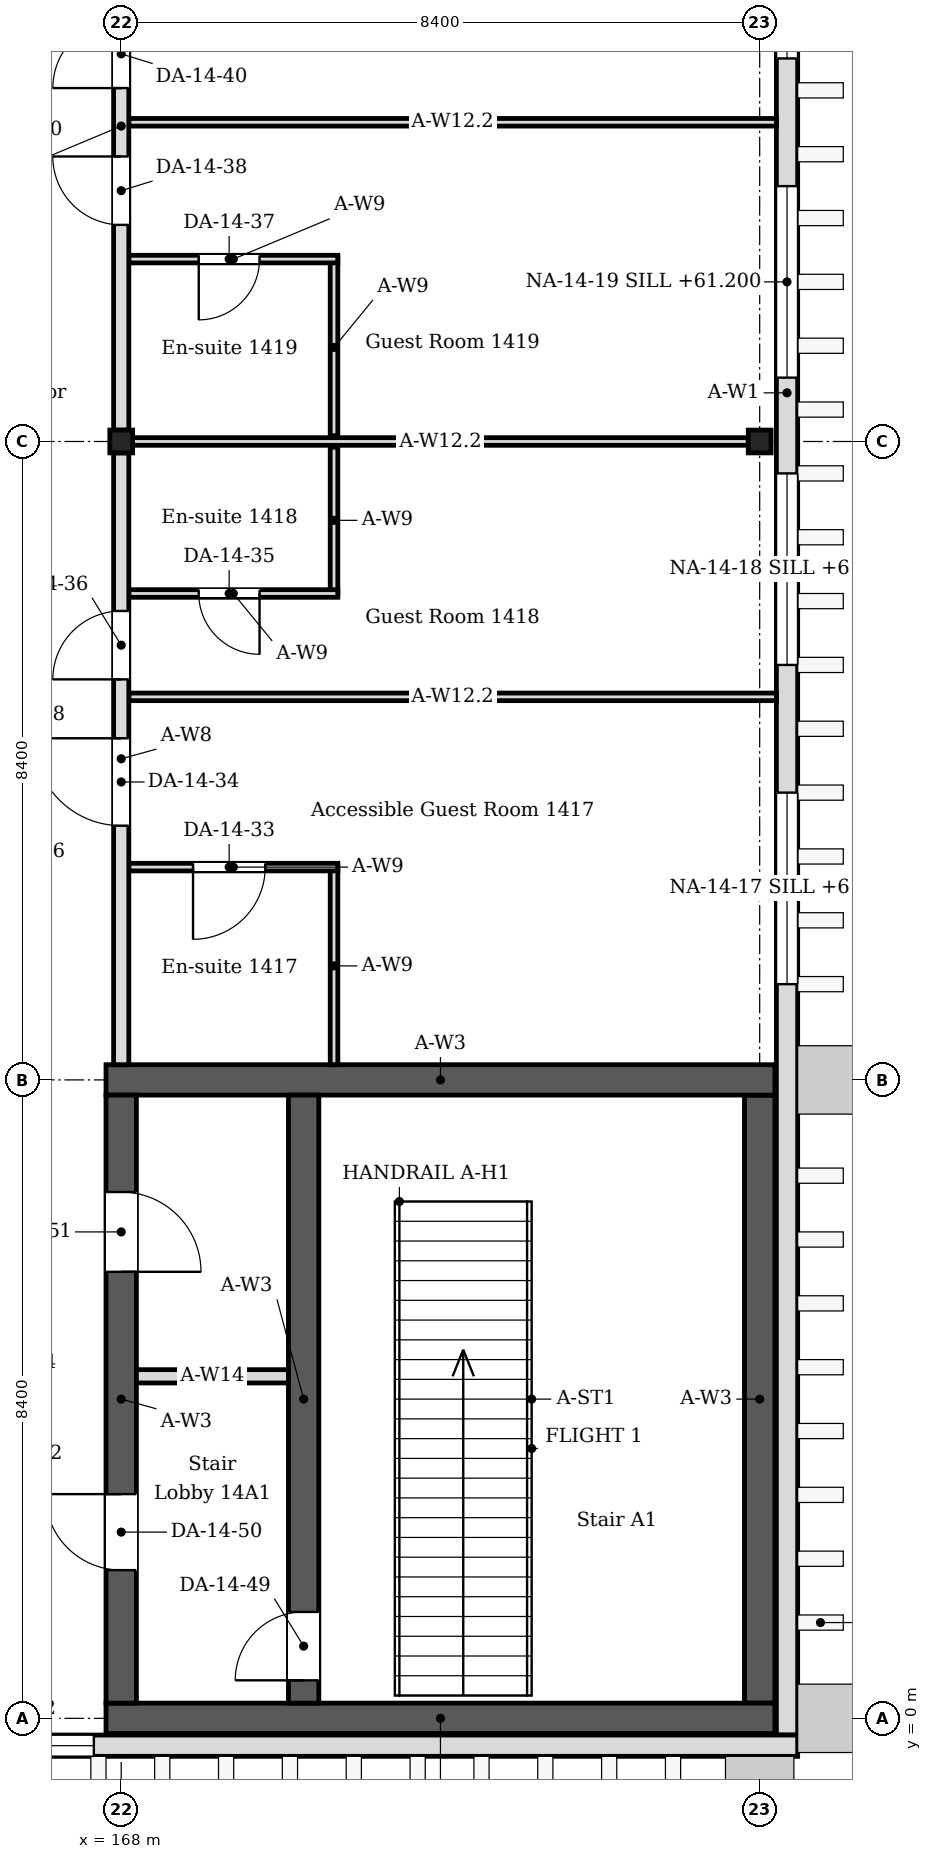
"""IFC4 building model, lengths in metres.
Left out: names, types, materials, properties, quantities, classifications, styles, units other than length and angle.
Written with IfcOpenShell. Run it as: python <this file> out.ifc"""

import sys

from ifc_helpers import new_model, si_unit, direction, frame, frame_2d, origin, origin_2d, place, context, subcontext, project, spatial, rectangle, i_section, extrude, element, fill, save


model = new_model("IFC4")
c1 = context("Model", 3, precision=1e-05, world=origin(), true_north=direction((0.0, 1.0)))
c2 = subcontext(c1, "Body", "Model", "MODEL_VIEW")
j1 = project(units=[si_unit("LENGTHUNIT", "METRE"), si_unit("PLANEANGLEUNIT", "RADIAN")], contexts=[c1])
p1 = place(None, origin())
s1 = spatial("IfcSite", under=j1, at=p1, CompositionType="ELEMENT")
p2 = place(p1, origin())
s2 = spatial("IfcBuilding", under=s1, at=p2, CompositionType="ELEMENT")
p3 = place(p2, frame((0.0, 0.0, 60.6)))
s3 = spatial("IfcBuildingStorey", under=s2, at=p3, CompositionType="ELEMENT", Elevation=60.6)
for number, where, z_axis, x_axis in (
    (1, (168.0, 16.8, 0.0), (0.0, 0.0, 1.0), (1.0, 0.0, 0.0)),
    (2, (176.4, 16.8, 0.0), (0.0, 0.0, 1.0), (1.0, 0.0, 0.0)),
):
    element("IfcColumn", number, at=place(p3, frame(where, z_axis=z_axis, x_axis=x_axis)), inside=s3, PredefinedType="COLUMN", context=c2, shape_type="SweptSolid", body=[
        extrude(i_section(OverallWidth=0.3, OverallDepth=0.3, WebThickness=0.01, FlangeThickness=0.015, FilletRadius=0.013, at=origin_2d()), origin(), (0.0, 0.0, 1.0), 4.2),
    ])
for number, where, z_axis, x_axis in (
    (3, (167.8, 0.0, 0.0), (0.0, 0.0, 1.0), (1.0, 0.0, 0.0)),
    (4, (167.8, 8.4, 0.0), (0.0, 0.0, 1.0), (1.0, 0.0, 0.0)),
):
    element("IfcWall", number, at=place(p3, frame(where, z_axis=z_axis, x_axis=x_axis)), inside=s3, PredefinedType="SOLIDWALL", context=c2, shape_type="SweptSolid", body=[
        extrude(rectangle(XDim=8.8, YDim=0.4, at=frame_2d((4.4, 0.0))), origin(), (0.0, 0.0, 1.0), 4.05),
    ])
p4 = place(p3, frame((168.0, 0.2, 0.0), z_axis=(0.0, 0.0, 1.0), x_axis=(0.0, 1.0, 0.0)))
e5 = element("IfcWall", 5, at=p4, inside=s3, PredefinedType="SOLIDWALL", context=c2, shape_type="SweptSolid", body=[
    extrude(rectangle(XDim=8.0, YDim=0.4, at=frame_2d((4.0, 0.0))), origin(), (0.0, 0.0, 1.0), 4.05),
])
p5 = place(p4, frame((1.75, 0.0, 0.0)))
e6 = element("IfcOpeningElement", 6, at=p5, cuts=e5, PredefinedType="OPENING", context=c2, shape_type="SweptSolid", body=[
    extrude(rectangle(XDim=1.0, YDim=2.1, at=frame_2d((0.5, 1.05))), frame((0.0, 0.21, 0.0), z_axis=(0.0, -1.0, 0.0), x_axis=(1.0, 0.0, 0.0)), (0.0, 0.0, 1.0), 0.42),
])
p6 = place(p4, frame((5.675, 0.0, 0.0)))
e7 = element("IfcOpeningElement", 7, at=p6, cuts=e5, PredefinedType="OPENING", context=c2, shape_type="SweptSolid", body=[
    extrude(rectangle(XDim=1.05, YDim=2.1, at=frame_2d((0.525, 1.05))), frame((0.0, 0.21, 0.0), z_axis=(0.0, -1.0, 0.0), x_axis=(1.0, 0.0, 0.0)), (0.0, 0.0, 1.0), 0.42),
])
p7 = place(p3, frame((176.4, 0.2, 0.0), z_axis=(0.0, 0.0, 1.0), x_axis=(0.0, 1.0, 0.0)))
e8 = element("IfcWall", 8, at=p7, inside=s3, PredefinedType="SOLIDWALL", context=c2, shape_type="SweptSolid", body=[
    extrude(rectangle(XDim=8.0, YDim=0.4, at=frame_2d((4.0, 0.0))), origin(), (0.0, 0.0, 1.0), 4.05),
])
p8 = place(p3, frame((176.76, -0.22, 0.0), z_axis=(0.0, 0.0, 1.0), x_axis=(0.0, 1.0, 0.0)))
e9 = element("IfcWall", 9, at=p8, inside=s3, PredefinedType="SOLIDWALL", context=c2, shape_type="SweptSolid", body=[
    extrude(rectangle(XDim=67.64, YDim=0.28, at=frame_2d((33.82, 0.0))), origin(), (0.0, 0.0, 1.0), 4.05),
])
p9 = place(p8, frame((9.88, 0.0, 0.45)))
e10 = element("IfcOpeningElement", 10, at=p9, cuts=e9, PredefinedType="OPENING", context=c2, shape_type="SweptSolid", body=[
    extrude(rectangle(XDim=2.52, YDim=2.1, at=frame_2d((1.26, 1.05))), frame((0.0, 0.15, 0.0), z_axis=(0.0, -1.0, 0.0), x_axis=(1.0, 0.0, 0.0)), (0.0, 0.0, 1.0), 0.3),
])
p10 = place(p8, frame((14.08, 0.0, 0.6)))
e11 = element("IfcOpeningElement", 11, at=p10, cuts=e9, PredefinedType="OPENING", context=c2, shape_type="SweptSolid", body=[
    extrude(rectangle(XDim=2.52, YDim=2.4, at=frame_2d((1.26, 1.2))), frame((0.0, 0.15, 0.0), z_axis=(0.0, -1.0, 0.0), x_axis=(1.0, 0.0, 0.0)), (0.0, 0.0, 1.0), 0.3),
])
p11 = place(p8, frame((17.86, 0.0, 0.6)))
e12 = element("IfcOpeningElement", 12, at=p11, cuts=e9, PredefinedType="OPENING", context=c2, shape_type="SweptSolid", body=[
    extrude(rectangle(XDim=2.52, YDim=2.4, at=frame_2d((1.26, 1.2))), frame((0.0, 0.15, 0.0), z_axis=(0.0, -1.0, 0.0), x_axis=(1.0, 0.0, 0.0)), (0.0, 0.0, 1.0), 0.3),
])
p12 = place(p8, frame((22.06, 0.0, 0.6)))
e13 = element("IfcOpeningElement", 13, at=p12, cuts=e9, PredefinedType="OPENING", context=c2, shape_type="SweptSolid", body=[
    extrude(rectangle(XDim=2.52, YDim=2.4, at=frame_2d((1.26, 1.2))), frame((0.0, 0.15, 0.0), z_axis=(0.0, -1.0, 0.0), x_axis=(1.0, 0.0, 0.0)), (0.0, 0.0, 1.0), 0.3),
])
p13 = place(p8, frame((42.64, 0.0, 0.6)))
e14 = element("IfcOpeningElement", 14, at=p13, cuts=e9, PredefinedType="OPENING", context=c2, shape_type="SweptSolid", body=[
    extrude(rectangle(XDim=2.52, YDim=2.4, at=frame_2d((1.26, 1.2))), frame((0.0, 0.15, 0.0), z_axis=(0.0, -1.0, 0.0), x_axis=(1.0, 0.0, 0.0)), (0.0, 0.0, 1.0), 0.3),
])
p14 = place(p8, frame((46.84, 0.0, 0.6)))
e15 = element("IfcOpeningElement", 15, at=p14, cuts=e9, PredefinedType="OPENING", context=c2, shape_type="SweptSolid", body=[
    extrude(rectangle(XDim=2.52, YDim=2.4, at=frame_2d((1.26, 1.2))), frame((0.0, 0.15, 0.0), z_axis=(0.0, -1.0, 0.0), x_axis=(1.0, 0.0, 0.0)), (0.0, 0.0, 1.0), 0.3),
])
p15 = place(p8, frame((51.04, 0.0, 0.6)))
e16 = element("IfcOpeningElement", 16, at=p15, cuts=e9, PredefinedType="OPENING", context=c2, shape_type="SweptSolid", body=[
    extrude(rectangle(XDim=2.52, YDim=2.4, at=frame_2d((1.26, 1.2))), frame((0.0, 0.15, 0.0), z_axis=(0.0, -1.0, 0.0), x_axis=(1.0, 0.0, 0.0)), (0.0, 0.0, 1.0), 0.3),
])
p16 = place(p8, frame((55.24, 0.0, 0.6)))
e17 = element("IfcOpeningElement", 17, at=p16, cuts=e9, PredefinedType="OPENING", context=c2, shape_type="SweptSolid", body=[
    extrude(rectangle(XDim=2.52, YDim=2.4, at=frame_2d((1.26, 1.2))), frame((0.0, 0.15, 0.0), z_axis=(0.0, -1.0, 0.0), x_axis=(1.0, 0.0, 0.0)), (0.0, 0.0, 1.0), 0.3),
])
p17 = place(p3, frame((156.7, -0.36, 0.0), z_axis=(0.0, 0.0, 1.0), x_axis=(1.0, 0.0, 0.0)))
e18 = element("IfcWall", 18, at=p17, inside=s3, PredefinedType="SOLIDWALL", context=c2, shape_type="SweptSolid", body=[
    extrude(rectangle(XDim=20.2, YDim=0.28, at=frame_2d((10.1, 0.0))), origin(), (0.0, 0.0, 1.0), 4.05),
])
p18 = place(p17, frame((9.26, 0.0, 0.6)))
e19 = element("IfcOpeningElement", 19, at=p18, cuts=e18, PredefinedType="OPENING", context=c2, shape_type="SweptSolid", body=[
    extrude(rectangle(XDim=1.68, YDim=2.4, at=frame_2d((0.84, 1.2))), frame((0.0, 0.15, 0.0), z_axis=(0.0, -1.0, 0.0), x_axis=(1.0, 0.0, 0.0)), (0.0, 0.0, 1.0), 0.3),
])
p19 = place(p17, frame((3.34, 0.0, 0.6)))
e20 = element("IfcOpeningElement", 20, at=p19, cuts=e18, PredefinedType="OPENING", context=c2, shape_type="SweptSolid", body=[
    extrude(rectangle(XDim=2.52, YDim=2.4, at=frame_2d((1.26, 1.2))), frame((0.0, 0.15, 0.0), z_axis=(0.0, -1.0, 0.0), x_axis=(1.0, 0.0, 0.0)), (0.0, 0.0, 1.0), 0.3),
])
p20 = place(p3, frame((170.8, 8.6, 0.0), z_axis=(0.0, 0.0, 1.0), x_axis=(0.0, 1.0, 0.0)))
e21 = element("IfcWall", 21, at=p20, inside=s3, PredefinedType="PARTITIONING", context=c2, shape_type="SweptSolid", body=[
    extrude(rectangle(XDim=2.6, YDim=0.1, at=frame_2d((1.3, 0.0))), origin(), (0.0, 0.0, 1.0), 4.05),
])
p21 = place(p3, frame((170.85, 11.2, 0.0), z_axis=(0.0, 0.0, 1.0), x_axis=(-1.0, 0.0, 0.0)))
e22 = element("IfcWall", 22, at=p21, inside=s3, PredefinedType="PARTITIONING", context=c2, shape_type="SweptSolid", body=[
    extrude(rectangle(XDim=2.75, YDim=0.1, at=frame_2d((1.375, 0.0))), origin(), (0.0, 0.0, 1.0), 4.05),
])
p22 = place(p21, frame((0.955, 0.0, 0.0)))
e23 = element("IfcOpeningElement", 23, at=p22, cuts=e22, PredefinedType="OPENING", context=c2, shape_type="SweptSolid", body=[
    extrude(rectangle(XDim=0.95, YDim=2.1, at=frame_2d((0.475, 1.05))), frame((0.0, 0.06, 0.0), z_axis=(0.0, -1.0, 0.0), x_axis=(1.0, 0.0, 0.0)), (0.0, 0.0, 1.0), 0.12),
])
p23 = place(p3, frame((170.8, 14.8, 0.0), z_axis=(0.0, 0.0, 1.0), x_axis=(0.0, 1.0, 0.0)))
e24 = element("IfcWall", 24, at=p23, inside=s3, PredefinedType="PARTITIONING", context=c2, shape_type="SweptSolid", body=[
    extrude(rectangle(XDim=1.925, YDim=0.1, at=frame_2d((0.962, 0.0))), origin(), (0.0, 0.0, 1.0), 4.05),
])
p24 = place(p3, frame((170.85, 14.8, 0.0), z_axis=(0.0, 0.0, 1.0), x_axis=(-1.0, 0.0, 0.0)))
e25 = element("IfcWall", 25, at=p24, inside=s3, PredefinedType="PARTITIONING", context=c2, shape_type="SweptSolid", body=[
    extrude(rectangle(XDim=2.75, YDim=0.1, at=frame_2d((1.375, 0.0))), origin(), (0.0, 0.0, 1.0), 4.05),
])
p25 = place(p24, frame((1.03, 0.0, 0.0)))
e26 = element("IfcOpeningElement", 26, at=p25, cuts=e25, PredefinedType="OPENING", context=c2, shape_type="SweptSolid", body=[
    extrude(rectangle(XDim=0.8, YDim=2.1, at=frame_2d((0.4, 1.05))), frame((0.0, 0.06, 0.0), z_axis=(0.0, -1.0, 0.0), x_axis=(1.0, 0.0, 0.0)), (0.0, 0.0, 1.0), 0.12),
])
p26 = place(p3, frame((170.8, 16.875, 0.0), z_axis=(0.0, 0.0, 1.0), x_axis=(0.0, 1.0, 0.0)))
e27 = element("IfcWall", 27, at=p26, inside=s3, PredefinedType="PARTITIONING", context=c2, shape_type="SweptSolid", body=[
    extrude(rectangle(XDim=2.325, YDim=0.1, at=frame_2d((1.163, 0.0))), origin(), (0.0, 0.0, 1.0), 4.05),
])
p27 = place(p3, frame((170.85, 19.2, 0.0), z_axis=(0.0, 0.0, 1.0), x_axis=(-1.0, 0.0, 0.0)))
e28 = element("IfcWall", 28, at=p27, inside=s3, PredefinedType="PARTITIONING", context=c2, shape_type="SweptSolid", body=[
    extrude(rectangle(XDim=2.75, YDim=0.1, at=frame_2d((1.375, 0.0))), origin(), (0.0, 0.0, 1.0), 4.05),
])
p28 = place(p27, frame((1.03, 0.0, 0.0)))
e29 = element("IfcOpeningElement", 29, at=p28, cuts=e28, PredefinedType="OPENING", context=c2, shape_type="SweptSolid", body=[
    extrude(rectangle(XDim=0.8, YDim=2.1, at=frame_2d((0.4, 1.05))), frame((0.0, 0.06, 0.0), z_axis=(0.0, -1.0, 0.0), x_axis=(1.0, 0.0, 0.0)), (0.0, 0.0, 1.0), 0.12),
])
p29 = place(p3, frame((168.15, 16.8, 0.0), z_axis=(0.0, 0.0, 1.0), x_axis=(1.0, 0.0, 0.0)))
e30 = element("IfcWall", 30, at=p29, inside=s3, PredefinedType="PARTITIONING", context=c2, shape_type="SweptSolid", body=[
    extrude(rectangle(XDim=8.1, YDim=0.1, at=frame_2d((4.05, 0.0))), origin(), (0.0, 0.0, 1.0), 3.55),
])
for number, where, z_axis, x_axis in (
    (31, (168.1, 13.44, 0.0), (0.0, 0.0, 1.0), (1.0, 0.0, 0.0)),
    (32, (168.1, 21.0, 0.0), (0.0, 0.0, 1.0), (1.0, 0.0, 0.0)),
):
    element("IfcWall", number, at=place(p3, frame(where, z_axis=z_axis, x_axis=x_axis)), inside=s3, PredefinedType="PARTITIONING", context=c2, shape_type="SweptSolid", body=[
        extrude(rectangle(XDim=8.52, YDim=0.1, at=frame_2d((4.26, 0.0))), origin(), (0.0, 0.0, 1.0), 3.55),
    ])
p30 = place(p3, frame((168.0, 8.6, 0.0), z_axis=(0.0, 0.0, 1.0), x_axis=(0.0, 1.0, 0.0)))
e33 = element("IfcWall", 33, at=p30, inside=s3, PredefinedType="PARTITIONING", context=c2, shape_type="SweptSolid", body=[
    extrude(rectangle(XDim=8.05, YDim=0.2, at=frame_2d((4.025, 0.0))), origin(), (0.0, 0.0, 1.0), 3.45),
])
p31 = place(p30, frame((3.145, 0.0, 0.0)))
e34 = element("IfcOpeningElement", 34, at=p31, cuts=e33, PredefinedType="OPENING", context=c2, shape_type="SweptSolid", body=[
    extrude(rectangle(XDim=1.15, YDim=2.1, at=frame_2d((0.575, 1.05))), frame((0.0, 0.11, 0.0), z_axis=(0.0, -1.0, 0.0), x_axis=(1.0, 0.0, 0.0)), (0.0, 0.0, 1.0), 0.22),
])
p32 = place(p30, frame((5.07, 0.0, 0.0)))
e35 = element("IfcOpeningElement", 35, at=p32, cuts=e33, PredefinedType="OPENING", context=c2, shape_type="SweptSolid", body=[
    extrude(rectangle(XDim=0.9, YDim=2.1, at=frame_2d((0.45, 1.05))), frame((0.0, 0.11, 0.0), z_axis=(0.0, -1.0, 0.0), x_axis=(1.0, 0.0, 0.0)), (0.0, 0.0, 1.0), 0.22),
])
p33 = place(p3, frame((168.0, 16.95, 0.0), z_axis=(0.0, 0.0, 1.0), x_axis=(0.0, 1.0, 0.0)))
e36 = element("IfcWall", 36, at=p33, inside=s3, PredefinedType="PARTITIONING", context=c2, shape_type="SweptSolid", body=[
    extrude(rectangle(XDim=8.0, YDim=0.2, at=frame_2d((4.0, 0.0))), origin(), (0.0, 0.0, 1.0), 3.45),
])
p34 = place(p33, frame((2.7, 0.0, 0.0)))
e37 = element("IfcOpeningElement", 37, at=p34, cuts=e36, PredefinedType="OPENING", context=c2, shape_type="SweptSolid", body=[
    extrude(rectangle(XDim=0.9, YDim=2.1, at=frame_2d((0.45, 1.05))), frame((0.0, 0.11, 0.0), z_axis=(0.0, -1.0, 0.0), x_axis=(1.0, 0.0, 0.0)), (0.0, 0.0, 1.0), 0.22),
])
p35 = place(p33, frame((4.5, 0.0, 0.0)))
e38 = element("IfcOpeningElement", 38, at=p35, cuts=e36, PredefinedType="OPENING", context=c2, shape_type="SweptSolid", body=[
    extrude(rectangle(XDim=0.9, YDim=2.1, at=frame_2d((0.45, 1.05))), frame((0.0, 0.11, 0.0), z_axis=(0.0, -1.0, 0.0), x_axis=(1.0, 0.0, 0.0)), (0.0, 0.0, 1.0), 0.22),
])
p36 = place(p3, frame((170.4, 0.2, 0.0), z_axis=(0.0, 0.0, 1.0), x_axis=(0.0, 1.0, 0.0)))
e39 = element("IfcWall", 39, at=p36, inside=s3, PredefinedType="SOLIDWALL", context=c2, shape_type="SweptSolid", body=[
    extrude(rectangle(XDim=8.0, YDim=0.4, at=frame_2d((4.0, 0.0))), origin(), (0.0, 0.0, 1.0), 4.05),
])
p37 = place(p36, frame((0.3, 0.0, 0.0)))
e40 = element("IfcOpeningElement", 40, at=p37, cuts=e39, PredefinedType="OPENING", context=c2, shape_type="SweptSolid", body=[
    extrude(rectangle(XDim=0.9, YDim=2.1, at=frame_2d((0.45, 1.05))), frame((0.0, 0.21, 0.0), z_axis=(0.0, -1.0, 0.0), x_axis=(1.0, 0.0, 0.0)), (0.0, 0.0, 1.0), 0.42),
])
p38 = place(p3, frame((168.2, 4.5, 0.0), z_axis=(0.0, 0.0, 1.0), x_axis=(1.0, 0.0, 0.0)))
e41 = element("IfcWall", 41, at=p38, inside=s3, PredefinedType="PARTITIONING", context=c2, shape_type="SweptSolid", body=[
    extrude(rectangle(XDim=2.0, YDim=0.175, at=frame_2d((1.0, 0.0))), origin(), (0.0, 0.0, 1.0), 4.05),
])
p39 = place(p9, origin())
e42 = element("IfcWindow", 42, at=p39, inside=s3, PartitioningType="SINGLE_PANEL", PredefinedType="WINDOW", context=c2, shape_type="SweptSolid", body=[
    extrude(rectangle(XDim=2.52, YDim=2.1, at=frame_2d((1.26, 1.05))), frame((0.0, 0.03, 0.0), z_axis=(0.0, -1.0, 0.0), x_axis=(1.0, 0.0, 0.0)), (0.0, 0.0, 1.0), 0.06),
])
fill(e10, e42)
p40 = place(p10, origin())
e43 = element("IfcWindow", 43, at=p40, inside=s3, PartitioningType="SINGLE_PANEL", PredefinedType="WINDOW", context=c2, shape_type="SweptSolid", body=[
    extrude(rectangle(XDim=2.52, YDim=2.4, at=frame_2d((1.26, 1.2))), frame((0.0, 0.03, 0.0), z_axis=(0.0, -1.0, 0.0), x_axis=(1.0, 0.0, 0.0)), (0.0, 0.0, 1.0), 0.06),
])
fill(e11, e43)
p41 = place(p11, origin())
e44 = element("IfcWindow", 44, at=p41, inside=s3, PartitioningType="SINGLE_PANEL", PredefinedType="WINDOW", context=c2, shape_type="SweptSolid", body=[
    extrude(rectangle(XDim=2.52, YDim=2.4, at=frame_2d((1.26, 1.2))), frame((0.0, 0.03, 0.0), z_axis=(0.0, -1.0, 0.0), x_axis=(1.0, 0.0, 0.0)), (0.0, 0.0, 1.0), 0.06),
])
fill(e12, e44)
p42 = place(p12, origin())
e45 = element("IfcWindow", 45, at=p42, inside=s3, PartitioningType="SINGLE_PANEL", PredefinedType="WINDOW", context=c2, shape_type="SweptSolid", body=[
    extrude(rectangle(XDim=2.52, YDim=2.4, at=frame_2d((1.26, 1.2))), frame((0.0, 0.03, 0.0), z_axis=(0.0, -1.0, 0.0), x_axis=(1.0, 0.0, 0.0)), (0.0, 0.0, 1.0), 0.06),
])
fill(e13, e45)
p43 = place(p18, origin())
e46 = element("IfcWindow", 46, at=p43, inside=s3, PartitioningType="SINGLE_PANEL", PredefinedType="WINDOW", context=c2, shape_type="SweptSolid", body=[
    extrude(rectangle(XDim=1.68, YDim=2.4, at=frame_2d((0.84, 1.2))), frame((0.0, 0.03, 0.0), z_axis=(0.0, -1.0, 0.0), x_axis=(1.0, 0.0, 0.0)), (0.0, 0.0, 1.0), 0.06),
])
fill(e19, e46)
p44 = place(p22, origin())
e47 = element("IfcDoor", 47, at=p44, inside=s3, OperationType="SINGLE_SWING_RIGHT", PredefinedType="DOOR", context=c2, shape_type="SweptSolid", body=[
    extrude(rectangle(XDim=0.95, YDim=2.1, at=frame_2d((0.475, 1.05))), frame((0.0, 0.025, 0.0), z_axis=(0.0, -1.0, 0.0), x_axis=(1.0, 0.0, 0.0)), (0.0, 0.0, 1.0), 0.05),
])
fill(e23, e47)
p45 = place(p31, origin())
e48 = element("IfcDoor", 48, at=p45, inside=s3, OperationType="SINGLE_SWING_RIGHT", PredefinedType="DOOR", context=c2, shape_type="SweptSolid", body=[
    extrude(rectangle(XDim=1.15, YDim=2.1, at=frame_2d((0.575, 1.05))), frame((0.0, 0.025, 0.0), z_axis=(0.0, -1.0, 0.0), x_axis=(1.0, 0.0, 0.0)), (0.0, 0.0, 1.0), 0.05),
])
fill(e34, e48)
p46 = place(p25, origin())
e49 = element("IfcDoor", 49, at=p46, inside=s3, OperationType="SINGLE_SWING_LEFT", PredefinedType="DOOR", context=c2, shape_type="SweptSolid", body=[
    extrude(rectangle(XDim=0.8, YDim=2.1, at=frame_2d((0.4, 1.05))), frame((0.0, 0.025, 0.0), z_axis=(0.0, -1.0, 0.0), x_axis=(1.0, 0.0, 0.0)), (0.0, 0.0, 1.0), 0.05),
])
fill(e26, e49)
p47 = place(p32, origin())
e50 = element("IfcDoor", 50, at=p47, inside=s3, OperationType="SINGLE_SWING_LEFT", PredefinedType="DOOR", context=c2, shape_type="SweptSolid", body=[
    extrude(rectangle(XDim=0.9, YDim=2.1, at=frame_2d((0.45, 1.05))), frame((0.0, 0.025, 0.0), z_axis=(0.0, -1.0, 0.0), x_axis=(1.0, 0.0, 0.0)), (0.0, 0.0, 1.0), 0.05),
])
fill(e35, e50)
p48 = place(p28, origin())
e51 = element("IfcDoor", 51, at=p48, inside=s3, OperationType="SINGLE_SWING_RIGHT", PredefinedType="DOOR", context=c2, shape_type="SweptSolid", body=[
    extrude(rectangle(XDim=0.8, YDim=2.1, at=frame_2d((0.4, 1.05))), frame((0.0, 0.025, 0.0), z_axis=(0.0, -1.0, 0.0), x_axis=(1.0, 0.0, 0.0)), (0.0, 0.0, 1.0), 0.05),
])
fill(e29, e51)
p49 = place(p34, origin())
e52 = element("IfcDoor", 52, at=p49, inside=s3, OperationType="SINGLE_SWING_RIGHT", PredefinedType="DOOR", context=c2, shape_type="SweptSolid", body=[
    extrude(rectangle(XDim=0.9, YDim=2.1, at=frame_2d((0.45, 1.05))), frame((0.0, 0.025, 0.0), z_axis=(0.0, -1.0, 0.0), x_axis=(1.0, 0.0, 0.0)), (0.0, 0.0, 1.0), 0.05),
])
fill(e37, e52)
p50 = place(p35, origin())
e53 = element("IfcDoor", 53, at=p50, inside=s3, OperationType="SINGLE_SWING_LEFT", PredefinedType="DOOR", context=c2, shape_type="SweptSolid", body=[
    extrude(rectangle(XDim=0.9, YDim=2.1, at=frame_2d((0.45, 1.05))), frame((0.0, 0.025, 0.0), z_axis=(0.0, -1.0, 0.0), x_axis=(1.0, 0.0, 0.0)), (0.0, 0.0, 1.0), 0.05),
])
fill(e38, e53)
p51 = place(p37, origin())
e54 = element("IfcDoor", 54, at=p51, inside=s3, OperationType="SINGLE_SWING_LEFT", PredefinedType="DOOR", context=c2, shape_type="SweptSolid", body=[
    extrude(rectangle(XDim=0.9, YDim=2.1, at=frame_2d((0.45, 1.05))), frame((0.0, 0.025, 0.0), z_axis=(0.0, -1.0, 0.0), x_axis=(1.0, 0.0, 0.0)), (0.0, 0.0, 1.0), 0.05),
])
fill(e40, e54)
p52 = place(p5, origin())
e55 = element("IfcDoor", 55, at=p52, inside=s3, OperationType="SINGLE_SWING_RIGHT", PredefinedType="DOOR", context=c2, shape_type="SweptSolid", body=[
    extrude(rectangle(XDim=1.0, YDim=2.1, at=frame_2d((0.5, 1.05))), frame((0.0, 0.025, 0.0), z_axis=(0.0, -1.0, 0.0), x_axis=(1.0, 0.0, 0.0)), (0.0, 0.0, 1.0), 0.05),
])
fill(e6, e55)
p53 = place(p6, origin())
e56 = element("IfcDoor", 56, at=p53, inside=s3, OperationType="SINGLE_SWING_LEFT", PredefinedType="DOOR", context=c2, shape_type="SweptSolid", body=[
    extrude(rectangle(XDim=1.05, YDim=2.1, at=frame_2d((0.525, 1.05))), frame((0.0, 0.025, 0.0), z_axis=(0.0, -1.0, 0.0), x_axis=(1.0, 0.0, 0.0)), (0.0, 0.0, 1.0), 0.05),
])
fill(e7, e56)
save(model, sys.argv[1])
